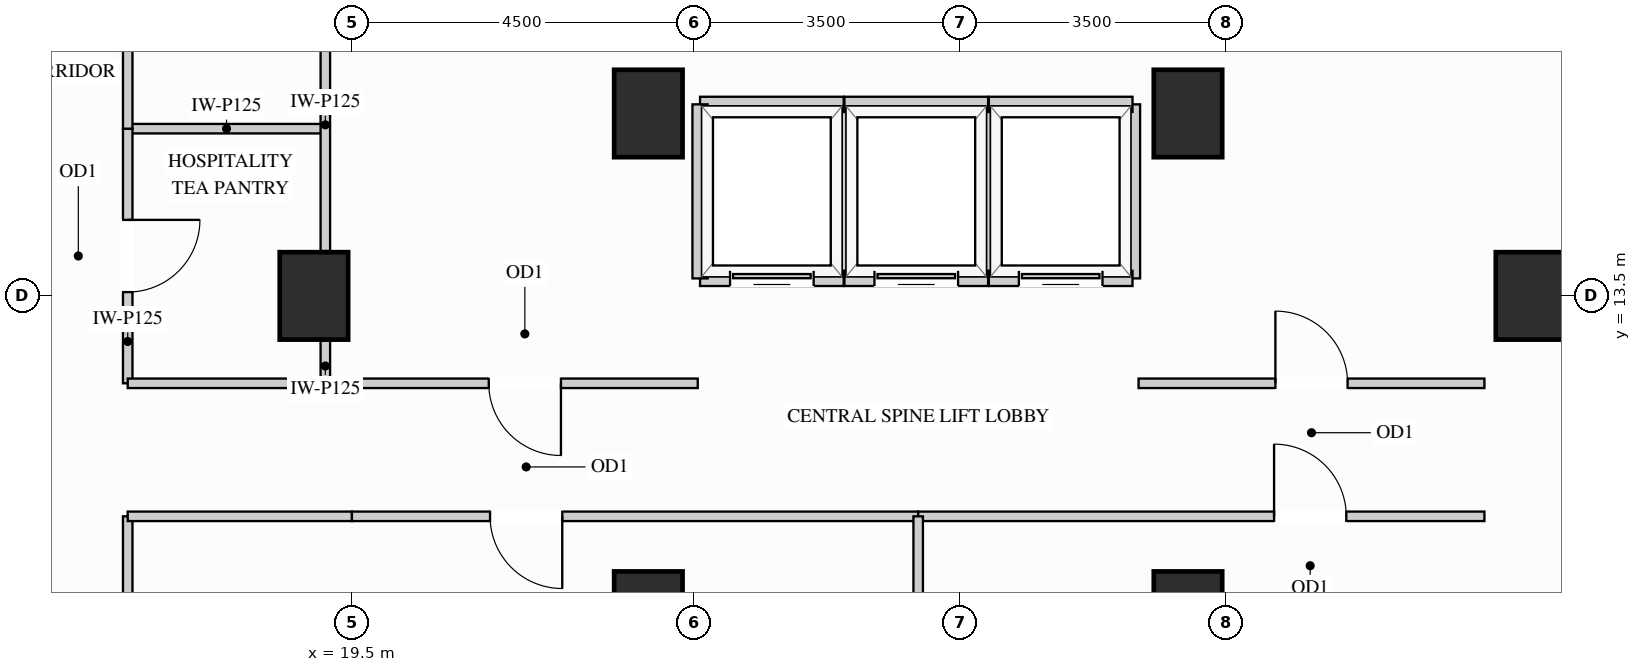
"""IFC4 building model, lengths in metres.
Left out: names, types, materials, properties, quantities, classifications, styles, units other than length and angle.
Written with IfcOpenShell. Run it as: python <this file> out.ifc"""

import sys

from ifc_helpers import new_model, si_unit, direction, frame, frame_2d, origin, origin_2d, place, context, subcontext, project, spatial, rectangle, extrude, source, transform, mapped, element, fill, save


model = new_model("IFC4")
c1 = context("Model", 3, precision=1e-05, world=origin(), true_north=direction((0.0, 1.0)))
c2 = subcontext(c1, "Body", "Model", "MODEL_VIEW")
j1 = project(units=[si_unit("LENGTHUNIT", "METRE"), si_unit("PLANEANGLEUNIT", "RADIAN")], contexts=[c1])
p1 = place(None, origin())
s1 = spatial("IfcSite", under=j1, at=p1, CompositionType="ELEMENT")
p2 = place(p1, origin())
s2 = spatial("IfcBuilding", under=s1, at=p2, CompositionType="ELEMENT")
p3 = place(p2, frame((0.0, 0.0, 124.2)))
s3 = spatial("IfcBuildingStorey", under=s2, at=p3, CompositionType="ELEMENT", Elevation=124.2)
m1 = source(origin(), c2, "Body", "SweptSolid", [
    extrude(rectangle(XDim=0.9, YDim=1.15, at=origin_2d()), origin(), (0.0, 0.0, 1.0), 3.38),
])
for number, where, z_axis, x_axis in (
    (1, (19.0, 13.5, 0.0), (0.0, 0.0, 1.0), (1.0, 0.0, 0.0)),
    (2, (35.0, 13.5, 0.0), (0.0, 0.0, 1.0), (1.0, 0.0, 0.0)),
    (3, (23.4, 15.9, 0.0), (0.0, 0.0, 1.0), (1.0, 0.0, 0.0)),
    (4, (23.4, 9.3, 0.0), (0.0, 0.0, 1.0), (1.0, 0.0, 0.0)),
    (5, (30.5, 15.9, 0.0), (0.0, 0.0, 1.0), (1.0, 0.0, 0.0)),
    (6, (30.5, 9.3, 0.0), (0.0, 0.0, 1.0), (1.0, 0.0, 0.0)),
):
    element("IfcColumn", number, at=place(p3, frame(where, z_axis=z_axis, x_axis=x_axis)), inside=s3, PredefinedType="COLUMN", context=c2, shape_type="MappedRepresentation", body=[
        mapped(m1, transform((0.0, 0.0, 0.0), x_axis=(1.0, 0.0, 0.0), y_axis=(0.0, 1.0, 0.0), z_axis=(0.0, 0.0, 1.0))),
    ])
m2 = source(origin(), c2, "Body", "SweptSolid", [
    extrude(rectangle(XDim=2.6, YDim=0.125, at=frame_2d((1.3, 0.0))), origin(), (0.0, 0.0, 1.0), 3.365),
])
p4 = place(p3, frame((16.55, 15.7, 0.0), z_axis=(0.0, 0.0, 1.0), x_axis=(1.0, 0.0, 0.0)))
e7 = element("IfcWall", 7, at=p4, inside=s3, PredefinedType="PARTITIONING", context=c2, shape_type="MappedRepresentation", body=[
    mapped(m2, transform((0.0, 0.0, 0.0), x_axis=(1.0, 0.0, 0.0), y_axis=(0.0, 1.0, 0.0), z_axis=(0.0, 0.0, 1.0))),
])
m3 = source(origin(), c2, "Body", "SweptSolid", [
    extrude(rectangle(XDim=0.56, YDim=0.125, at=frame_2d((0.28, 0.0))), origin(), (0.0, 0.0, 1.0), 2.677),
])
p5 = place(p3, frame((19.15, 12.35, 0.0), z_axis=(0.0, 0.0, 1.0), x_axis=(0.0, 1.0, 0.0)))
e8 = element("IfcWall", 8, at=p5, inside=s3, PredefinedType="PARTITIONING", context=c2, shape_type="MappedRepresentation", body=[
    mapped(m3, transform((0.0, 0.0, 0.0), x_axis=(1.0, 0.0, 0.0), y_axis=(0.0, 1.0, 0.0), z_axis=(0.0, 0.0, 1.0))),
])
m4 = source(origin(), c2, "Body", "SweptSolid", [
    extrude(rectangle(XDim=3.32, YDim=0.125, at=frame_2d((1.66, 0.0))), origin(), (0.0, 0.0, 1.0), 2.677),
])
p6 = place(p3, frame((19.15, 14.09, 0.0), z_axis=(0.0, 0.0, 1.0), x_axis=(0.0, 1.0, 0.0)))
e9 = element("IfcWall", 9, at=p6, inside=s3, PredefinedType="PARTITIONING", context=c2, shape_type="MappedRepresentation", body=[
    mapped(m4, transform((0.0, 0.0, 0.0), x_axis=(1.0, 0.0, 0.0), y_axis=(0.0, 1.0, 0.0), z_axis=(0.0, 0.0, 1.0))),
])
p7 = place(p3, frame((16.55, 12.35, 0.0), z_axis=(0.0, 0.0, 1.0), x_axis=(0.0, 1.0, 0.0)))
e10 = element("IfcWall", 10, at=p7, inside=s3, PredefinedType="PARTITIONING", context=c2, shape_type="SweptSolid", body=[
    extrude(rectangle(XDim=3.35, YDim=0.125, at=frame_2d((1.675, 0.0))), origin(), (0.0, 0.0, 1.0), 3.365),
])
p8 = place(p7, frame((1.2, 0.0, 0.0)))
e11 = element("IfcOpeningElement", 11, at=p8, cuts=e10, PredefinedType="OPENING", context=c2, shape_type="SweptSolid", body=[
    extrude(rectangle(XDim=0.95, YDim=2.15, at=frame_2d((0.475, 1.075))), frame((0.0, 0.073, 0.0), z_axis=(0.0, -1.0, 0.0), x_axis=(1.0, 0.0, 0.0)), (0.0, 0.0, 1.0), 0.145),
])
p9 = place(p3, frame((16.55, 15.7, 0.0), z_axis=(0.0, 0.0, 1.0), x_axis=(0.0, 1.0, 0.0)))
e12 = element("IfcWall", 12, at=p9, inside=s3, PredefinedType="PARTITIONING", context=c2, shape_type="SweptSolid", body=[
    extrude(rectangle(XDim=7.65, YDim=0.125, at=frame_2d((3.825, 0.0))), origin(), (0.0, 0.0, 1.0), 3.365),
])
p10 = place(p9, frame((3.35, 0.0, 0.0)))
e13 = element("IfcOpeningElement", 13, at=p10, cuts=e12, PredefinedType="OPENING", context=c2, shape_type="SweptSolid", body=[
    extrude(rectangle(XDim=0.95, YDim=2.15, at=frame_2d((0.475, 1.075))), frame((0.0, 0.073, 0.0), z_axis=(0.0, -1.0, 0.0), x_axis=(1.0, 0.0, 0.0)), (0.0, 0.0, 1.0), 0.145),
])
p11 = place(p3, frame((16.55, 4.7, 0.0), z_axis=(0.0, 0.0, 1.0), x_axis=(0.0, 1.0, 0.0)))
e14 = element("IfcWall", 14, at=p11, inside=s3, PredefinedType="PARTITIONING", context=c2, shape_type="SweptSolid", body=[
    extrude(rectangle(XDim=5.9, YDim=0.125, at=frame_2d((2.95, 0.0))), origin(), (0.0, 0.0, 1.0), 3.365),
])
p12 = place(p11, frame((2.475, 0.0, 0.0)))
e15 = element("IfcOpeningElement", 15, at=p12, cuts=e14, PredefinedType="OPENING", context=c2, shape_type="SweptSolid", body=[
    extrude(rectangle(XDim=0.95, YDim=2.15, at=frame_2d((0.475, 1.075))), frame((0.0, 0.073, 0.0), z_axis=(0.0, -1.0, 0.0), x_axis=(1.0, 0.0, 0.0)), (0.0, 0.0, 1.0), 0.145),
])
p13 = place(p3, frame((29.85, 12.35, 0.0), z_axis=(0.0, 0.0, 1.0), x_axis=(1.0, 0.0, 0.0)))
e16 = element("IfcWall", 16, at=p13, inside=s3, PredefinedType="PARTITIONING", context=c2, shape_type="SweptSolid", body=[
    extrude(rectangle(XDim=4.55, YDim=0.125, at=frame_2d((2.275, 0.0))), origin(), (0.0, 0.0, 1.0), 3.365),
])
p14 = place(p13, frame((1.8, 0.0, 0.0)))
e17 = element("IfcOpeningElement", 17, at=p14, cuts=e16, PredefinedType="OPENING", context=c2, shape_type="SweptSolid", body=[
    extrude(rectangle(XDim=0.95, YDim=2.15, at=frame_2d((0.475, 1.075))), frame((0.0, 0.073, 0.0), z_axis=(0.0, -1.0, 0.0), x_axis=(1.0, 0.0, 0.0)), (0.0, 0.0, 1.0), 0.145),
])
m5 = source(origin(), c2, "Body", "SweptSolid", [
    extrude(rectangle(XDim=2.95, YDim=0.125, at=frame_2d((1.475, 0.0))), origin(), (0.0, 0.0, 1.0), 3.365),
])
p15 = place(p3, frame((16.55, 12.35, 0.0), z_axis=(0.0, 0.0, 1.0), x_axis=(1.0, 0.0, 0.0)))
e18 = element("IfcWall", 18, at=p15, inside=s3, PredefinedType="PARTITIONING", context=c2, shape_type="MappedRepresentation", body=[
    mapped(m5, transform((0.0, 0.0, 0.0), x_axis=(1.0, 0.0, 0.0), y_axis=(0.0, 1.0, 0.0), z_axis=(0.0, 0.0, 1.0))),
])
p16 = place(p3, frame((19.5, 12.35, 0.0), z_axis=(0.0, 0.0, 1.0), x_axis=(1.0, 0.0, 0.0)))
e19 = element("IfcWall", 19, at=p16, inside=s3, PredefinedType="PARTITIONING", context=c2, shape_type="SweptSolid", body=[
    extrude(rectangle(XDim=4.55, YDim=0.125, at=frame_2d((2.275, 0.0))), origin(), (0.0, 0.0, 1.0), 3.365),
])
p17 = place(p16, frame((1.8, 0.0, 0.0)))
e20 = element("IfcOpeningElement", 20, at=p17, cuts=e19, PredefinedType="OPENING", context=c2, shape_type="SweptSolid", body=[
    extrude(rectangle(XDim=0.95, YDim=2.15, at=frame_2d((0.475, 1.075))), frame((0.0, 0.073, 0.0), z_axis=(0.0, -1.0, 0.0), x_axis=(1.0, 0.0, 0.0)), (0.0, 0.0, 1.0), 0.145),
])
p18 = place(p3, frame((16.55, 10.6, 0.0), z_axis=(0.0, 0.0, 1.0), x_axis=(1.0, 0.0, 0.0)))
e21 = element("IfcWall", 21, at=p18, inside=s3, PredefinedType="PARTITIONING", context=c2, shape_type="MappedRepresentation", body=[
    mapped(m5, transform((0.0, 0.0, 0.0), x_axis=(1.0, 0.0, 0.0), y_axis=(0.0, 1.0, 0.0), z_axis=(0.0, 0.0, 1.0))),
])
p19 = place(p3, frame((19.5, 10.6, 0.0), z_axis=(0.0, 0.0, 1.0), x_axis=(1.0, 0.0, 0.0)))
e22 = element("IfcWall", 22, at=p19, inside=s3, PredefinedType="PARTITIONING", context=c2, shape_type="SweptSolid", body=[
    extrude(rectangle(XDim=7.45, YDim=0.125, at=frame_2d((3.725, 0.0))), origin(), (0.0, 0.0, 1.0), 3.365),
])
p20 = place(p19, frame((1.817, 0.0, 0.0)))
e23 = element("IfcOpeningElement", 23, at=p20, cuts=e22, PredefinedType="OPENING", context=c2, shape_type="SweptSolid", body=[
    extrude(rectangle(XDim=0.95, YDim=2.15, at=frame_2d((0.475, 1.075))), frame((0.0, 0.073, 0.0), z_axis=(0.0, -1.0, 0.0), x_axis=(1.0, 0.0, 0.0)), (0.0, 0.0, 1.0), 0.145),
])
p21 = place(p3, frame((26.95, 10.6, 0.0), z_axis=(0.0, 0.0, 1.0), x_axis=(1.0, 0.0, 0.0)))
e24 = element("IfcWall", 24, at=p21, inside=s3, PredefinedType="PARTITIONING", context=c2, shape_type="SweptSolid", body=[
    extrude(rectangle(XDim=7.45, YDim=0.125, at=frame_2d((3.725, 0.0))), origin(), (0.0, 0.0, 1.0), 3.365),
])
p22 = place(p21, frame((4.683, 0.0, 0.0)))
e25 = element("IfcOpeningElement", 25, at=p22, cuts=e24, PredefinedType="OPENING", context=c2, shape_type="SweptSolid", body=[
    extrude(rectangle(XDim=0.95, YDim=2.15, at=frame_2d((0.475, 1.075))), frame((0.0, 0.073, 0.0), z_axis=(0.0, -1.0, 0.0), x_axis=(1.0, 0.0, 0.0)), (0.0, 0.0, 1.0), 0.145),
])
m6 = source(origin(), c2, "Body", "SweptSolid", [
    extrude(rectangle(XDim=1.748, YDim=0.125, at=frame_2d((0.874, 0.0))), origin(), (0.0, 0.0, 1.0), 3.365),
])
p23 = place(p3, frame((26.95, 8.852, 0.0), z_axis=(0.0, 0.0, 1.0), x_axis=(0.0, 1.0, 0.0)))
e26 = element("IfcWall", 26, at=p23, inside=s3, PredefinedType="PARTITIONING", context=c2, shape_type="MappedRepresentation", body=[
    mapped(m6, transform((0.0, 0.0, 0.0), x_axis=(1.0, 0.0, 0.0), y_axis=(0.0, 1.0, 0.0), z_axis=(0.0, 0.0, 1.0))),
])
m7 = source(origin(), c2, "Body", "SweptSolid", [
    extrude(rectangle(XDim=2.29, YDim=0.2, at=frame_2d((1.145, 0.0))), origin(), (0.0, 0.0, 1.0), 3.365),
])
p24 = place(p3, frame((25.97, 13.73, 0.0), z_axis=(0.0, 0.0, 1.0), x_axis=(0.0, 1.0, 0.0)))
e27 = element("IfcWall", 27, at=p24, inside=s3, PredefinedType="PARTITIONING", context=c2, shape_type="MappedRepresentation", body=[
    mapped(m7, transform((0.0, 0.0, 0.0), x_axis=(1.0, 0.0, 0.0), y_axis=(0.0, 1.0, 0.0), z_axis=(0.0, 0.0, 1.0))),
])
m8 = source(origin(), c2, "Body", "SweptSolid", [
    extrude(rectangle(XDim=1.89, YDim=0.2, at=frame_2d((0.945, 0.0))), origin(), (0.0, 0.0, 1.0), 2.677),
])
p25 = place(p3, frame((24.08, 16.02, 0.0), z_axis=(0.0, 0.0, 1.0), x_axis=(1.0, 0.0, 0.0)))
e28 = element("IfcWall", 28, at=p25, inside=s3, PredefinedType="PARTITIONING", context=c2, shape_type="MappedRepresentation", body=[
    mapped(m8, transform((0.0, 0.0, 0.0), x_axis=(1.0, 0.0, 0.0), y_axis=(0.0, 1.0, 0.0), z_axis=(0.0, 0.0, 1.0))),
])
p26 = place(p3, frame((24.08, 13.73, 0.0), z_axis=(0.0, 0.0, 1.0), x_axis=(1.0, 0.0, 0.0)))
e29 = element("IfcWall", 29, at=p26, inside=s3, PredefinedType="PARTITIONING", context=c2, shape_type="SweptSolid", body=[
    extrude(rectangle(XDim=1.89, YDim=0.2, at=frame_2d((0.945, 0.0))), origin(), (0.0, 0.0, 1.0), 2.446),
])
p27 = place(p26, frame((0.395, 0.0, 0.0)))
e30 = element("IfcOpeningElement", 30, at=p27, cuts=e29, PredefinedType="OPENING", context=c2, shape_type="SweptSolid", body=[
    extrude(rectangle(XDim=1.1, YDim=2.2, at=frame_2d((0.55, 1.1))), frame((0.0, 0.11, 0.0), z_axis=(0.0, -1.0, 0.0), x_axis=(1.0, 0.0, 0.0)), (0.0, 0.0, 1.0), 0.22),
])
for number, where, z_axis, x_axis in (
    (31, (24.08, 13.73, 0.0), (0.0, 0.0, 1.0), (0.0, 1.0, 0.0)),
    (32, (27.87, 13.73, 0.0), (0.0, 0.0, 1.0), (0.0, 1.0, 0.0)),
):
    element("IfcWall", number, at=place(p3, frame(where, z_axis=z_axis, x_axis=x_axis)), inside=s3, PredefinedType="PARTITIONING", context=c2, shape_type="MappedRepresentation", body=[
        mapped(m7, transform((0.0, 0.0, 0.0), x_axis=(1.0, 0.0, 0.0), y_axis=(0.0, 1.0, 0.0), z_axis=(0.0, 0.0, 1.0))),
    ])
m9 = source(origin(), c2, "Body", "SweptSolid", [
    extrude(rectangle(XDim=1.89, YDim=0.2, at=frame_2d((0.945, 0.0))), origin(), (0.0, 0.0, 1.0), 2.677),
])
p28 = place(p3, frame((25.98, 16.02, 0.0), z_axis=(0.0, 0.0, 1.0), x_axis=(1.0, 0.0, 0.0)))
e33 = element("IfcWall", 33, at=p28, inside=s3, PredefinedType="PARTITIONING", context=c2, shape_type="MappedRepresentation", body=[
    mapped(m9, transform((0.0, 0.0, 0.0), x_axis=(1.0, 0.0, 0.0), y_axis=(0.0, 1.0, 0.0), z_axis=(0.0, 0.0, 1.0))),
])
p29 = place(p3, frame((25.98, 13.73, 0.0), z_axis=(0.0, 0.0, 1.0), x_axis=(1.0, 0.0, 0.0)))
e34 = element("IfcWall", 34, at=p29, inside=s3, PredefinedType="PARTITIONING", context=c2, shape_type="SweptSolid", body=[
    extrude(rectangle(XDim=1.89, YDim=0.2, at=frame_2d((0.945, 0.0))), origin(), (0.0, 0.0, 1.0), 2.446),
])
p30 = place(p29, frame((0.395, 0.0, 0.0)))
e35 = element("IfcOpeningElement", 35, at=p30, cuts=e34, PredefinedType="OPENING", context=c2, shape_type="SweptSolid", body=[
    extrude(rectangle(XDim=1.1, YDim=2.2, at=frame_2d((0.55, 1.1))), frame((0.0, 0.11, 0.0), z_axis=(0.0, -1.0, 0.0), x_axis=(1.0, 0.0, 0.0)), (0.0, 0.0, 1.0), 0.22),
])
p31 = place(p3, frame((29.77, 13.73, 0.0), z_axis=(0.0, 0.0, 1.0), x_axis=(0.0, 1.0, 0.0)))
e36 = element("IfcWall", 36, at=p31, inside=s3, PredefinedType="PARTITIONING", context=c2, shape_type="MappedRepresentation", body=[
    mapped(m7, transform((0.0, 0.0, 0.0), x_axis=(1.0, 0.0, 0.0), y_axis=(0.0, 1.0, 0.0), z_axis=(0.0, 0.0, 1.0))),
])
p32 = place(p3, frame((27.88, 16.02, 0.0), z_axis=(0.0, 0.0, 1.0), x_axis=(1.0, 0.0, 0.0)))
e37 = element("IfcWall", 37, at=p32, inside=s3, PredefinedType="PARTITIONING", context=c2, shape_type="MappedRepresentation", body=[
    mapped(m9, transform((0.0, 0.0, 0.0), x_axis=(1.0, 0.0, 0.0), y_axis=(0.0, 1.0, 0.0), z_axis=(0.0, 0.0, 1.0))),
])
p33 = place(p3, frame((27.88, 13.73, 0.0), z_axis=(0.0, 0.0, 1.0), x_axis=(1.0, 0.0, 0.0)))
e38 = element("IfcWall", 38, at=p33, inside=s3, PredefinedType="PARTITIONING", context=c2, shape_type="SweptSolid", body=[
    extrude(rectangle(XDim=1.89, YDim=0.2, at=frame_2d((0.945, 0.0))), origin(), (0.0, 0.0, 1.0), 2.446),
])
p34 = place(p33, frame((0.395, 0.0, 0.0)))
e39 = element("IfcOpeningElement", 39, at=p34, cuts=e38, PredefinedType="OPENING", context=c2, shape_type="SweptSolid", body=[
    extrude(rectangle(XDim=1.1, YDim=2.2, at=frame_2d((0.55, 1.1))), frame((0.0, 0.11, 0.0), z_axis=(0.0, -1.0, 0.0), x_axis=(1.0, 0.0, 0.0)), (0.0, 0.0, 1.0), 0.22),
])
m10 = source(origin(), c2, "Body", "SweptSolid", [
    extrude(rectangle(XDim=1.1, YDim=2.2, at=frame_2d((0.55, 1.1))), frame((0.0, 0.025, 0.0), z_axis=(0.0, -1.0, 0.0), x_axis=(1.0, 0.0, 0.0)), (0.0, 0.0, 1.0), 0.05),
])
p35 = place(p27, origin())
e40 = element("IfcDoor", 40, at=p35, inside=s3, OperationType="SLIDING_TO_LEFT", PredefinedType="DOOR", context=c2, shape_type="MappedRepresentation", body=[
    mapped(m10, transform((0.0, 0.0, 0.0), x_axis=(1.0, 0.0, 0.0), y_axis=(0.0, 1.0, 0.0), z_axis=(0.0, 0.0, 1.0))),
])
fill(e30, e40)
p36 = place(p30, origin())
e41 = element("IfcDoor", 41, at=p36, inside=s3, OperationType="SLIDING_TO_LEFT", PredefinedType="DOOR", context=c2, shape_type="MappedRepresentation", body=[
    mapped(m10, transform((0.0, 0.0, 0.0), x_axis=(1.0, 0.0, 0.0), y_axis=(0.0, 1.0, 0.0), z_axis=(0.0, 0.0, 1.0))),
])
fill(e35, e41)
p37 = place(p34, origin())
e42 = element("IfcDoor", 42, at=p37, inside=s3, OperationType="SLIDING_TO_LEFT", PredefinedType="DOOR", context=c2, shape_type="MappedRepresentation", body=[
    mapped(m10, transform((0.0, 0.0, 0.0), x_axis=(1.0, 0.0, 0.0), y_axis=(0.0, 1.0, 0.0), z_axis=(0.0, 0.0, 1.0))),
])
fill(e39, e42)
m11 = source(origin(), c2, "Body", "SweptSolid", [
    extrude(rectangle(XDim=0.95, YDim=2.15, at=frame_2d((0.475, 1.075))), frame((0.0, 0.025, 0.0), z_axis=(0.0, -1.0, 0.0), x_axis=(1.0, 0.0, 0.0)), (0.0, 0.0, 1.0), 0.05),
])
p38 = place(p8, origin())
e43 = element("IfcDoor", 43, at=p38, inside=s3, OperationType="SINGLE_SWING_RIGHT", PredefinedType="DOOR", context=c2, shape_type="MappedRepresentation", body=[
    mapped(m11, transform((0.0, 0.0, 0.0), x_axis=(1.0, 0.0, 0.0), y_axis=(0.0, 1.0, 0.0), z_axis=(0.0, 0.0, 1.0))),
])
fill(e11, e43)
p39 = place(p17, origin())
e44 = element("IfcDoor", 44, at=p39, inside=s3, OperationType="SINGLE_SWING_RIGHT", PredefinedType="DOOR", context=c2, shape_type="MappedRepresentation", body=[
    mapped(m11, transform((0.0, 0.0, 0.0), x_axis=(1.0, 0.0, 0.0), y_axis=(0.0, 1.0, 0.0), z_axis=(0.0, 0.0, 1.0))),
])
fill(e20, e44)
p40 = place(p14, origin())
e45 = element("IfcDoor", 45, at=p40, inside=s3, OperationType="SINGLE_SWING_LEFT", PredefinedType="DOOR", context=c2, shape_type="MappedRepresentation", body=[
    mapped(m11, transform((0.0, 0.0, 0.0), x_axis=(1.0, 0.0, 0.0), y_axis=(0.0, 1.0, 0.0), z_axis=(0.0, 0.0, 1.0))),
])
fill(e17, e45)
p41 = place(p20, origin())
e46 = element("IfcDoor", 46, at=p41, inside=s3, OperationType="SINGLE_SWING_RIGHT", PredefinedType="DOOR", context=c2, shape_type="MappedRepresentation", body=[
    mapped(m11, transform((0.0, 0.0, 0.0), x_axis=(1.0, 0.0, 0.0), y_axis=(0.0, 1.0, 0.0), z_axis=(0.0, 0.0, 1.0))),
])
fill(e23, e46)
p42 = place(p22, origin())
e47 = element("IfcDoor", 47, at=p42, inside=s3, OperationType="SINGLE_SWING_LEFT", PredefinedType="DOOR", context=c2, shape_type="MappedRepresentation", body=[
    mapped(m11, transform((0.0, 0.0, 0.0), x_axis=(1.0, 0.0, 0.0), y_axis=(0.0, 1.0, 0.0), z_axis=(0.0, 0.0, 1.0))),
])
fill(e25, e47)
save(model, sys.argv[1])
